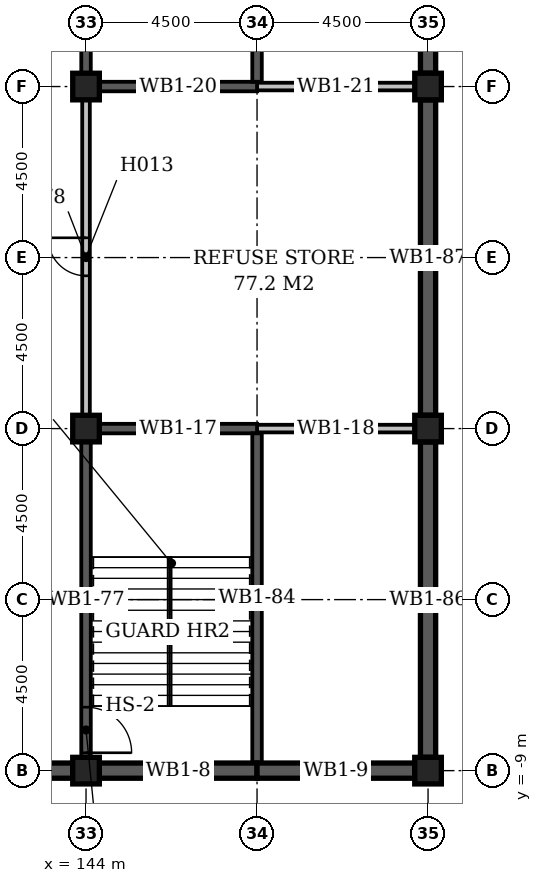
"""IFC4 building model, lengths in metres.
Left out: names, types, materials, properties, quantities, classifications, styles, units other than length and angle.
Written with IfcOpenShell. Run it as: python <this file> out.ifc"""

import sys

from ifc_helpers import new_model, si_unit, direction, frame, frame_2d, origin, origin_2d, place, context, subcontext, project, spatial, rectangle, extrude, element, fill, save


model = new_model("IFC4")
c1 = context("Model", 3, precision=1e-05, world=origin(), true_north=direction((0.0, 1.0)))
c2 = subcontext(c1, "Body", "Model", "MODEL_VIEW")
j1 = project(units=[si_unit("LENGTHUNIT", "METRE"), si_unit("PLANEANGLEUNIT", "RADIAN")], contexts=[c1])
p1 = place(None, origin())
s1 = spatial("IfcSite", under=j1, at=p1, CompositionType="ELEMENT")
p2 = place(p1, origin())
s2 = spatial("IfcBuilding", under=s1, at=p2, CompositionType="ELEMENT")
p3 = place(p2, frame((0.0, 0.0, -4.5)))
s3 = spatial("IfcBuildingStorey", under=s2, at=p3, CompositionType="ELEMENT", Elevation=-4.5)
for number, where, z_axis, x_axis in (
    (1, (144.0, -9.0, 0.0), (0.0, 0.0, 1.0), (1.0, 0.0, 0.0)),
    (2, (144.0, 0.0, 0.0), (0.0, 0.0, 1.0), (1.0, 0.0, 0.0)),
    (3, (144.0, 9.0, 0.0), (0.0, 0.0, 1.0), (1.0, 0.0, 0.0)),
    (4, (153.0, -9.0, 0.0), (0.0, 0.0, 1.0), (1.0, 0.0, 0.0)),
    (5, (153.0, 0.0, 0.0), (0.0, 0.0, 1.0), (1.0, 0.0, 0.0)),
    (6, (153.0, 9.0, 0.0), (0.0, 0.0, 1.0), (1.0, 0.0, 0.0)),
):
    element("IfcColumn", number, at=place(p3, frame(where, z_axis=z_axis, x_axis=x_axis)), inside=s3, PredefinedType="COLUMN", context=c2, shape_type="SweptSolid", body=[
        extrude(rectangle(XDim=0.7, YDim=0.7, at=origin_2d()), origin(), (0.0, 0.0, 1.0), 4.2),
    ])
p4 = place(p3, frame((135.35, -9.0, 0.0), z_axis=(0.0, 0.0, 1.0), x_axis=(1.0, 0.0, 0.0)))
e7 = element("IfcWall", 7, at=p4, inside=s3, PredefinedType="STANDARD", context=c2, shape_type="SweptSolid", body=[
    extrude(rectangle(XDim=8.3, YDim=0.4, at=frame_2d((4.15, 0.0))), origin(), (0.0, 0.0, 1.0), 4.2),
])
p5 = place(p3, frame((144.35, -9.0, 0.0), z_axis=(0.0, 0.0, 1.0), x_axis=(1.0, 0.0, 0.0)))
e8 = element("IfcWall", 8, at=p5, inside=s3, PredefinedType="STANDARD", context=c2, shape_type="SweptSolid", body=[
    extrude(rectangle(XDim=4.15, YDim=0.4, at=frame_2d((2.075, 0.0))), origin(), (0.0, 0.0, 1.0), 4.5),
])
p6 = place(p3, frame((148.5, -9.0, 0.0), z_axis=(0.0, 0.0, 1.0), x_axis=(1.0, 0.0, 0.0)))
e9 = element("IfcWall", 9, at=p6, inside=s3, PredefinedType="STANDARD", context=c2, shape_type="SweptSolid", body=[
    extrude(rectangle(XDim=4.15, YDim=0.4, at=frame_2d((2.075, 0.0))), origin(), (0.0, 0.0, 1.0), 4.2),
])
p7 = place(p3, frame((144.35, 0.0, 0.0), z_axis=(0.0, 0.0, 1.0), x_axis=(1.0, 0.0, 0.0)))
e10 = element("IfcWall", 10, at=p7, inside=s3, PredefinedType="STANDARD", context=c2, shape_type="SweptSolid", body=[
    extrude(rectangle(XDim=4.15, YDim=0.25, at=frame_2d((2.075, 0.0))), origin(), (0.0, 0.0, 1.0), 4.5),
])
p8 = place(p3, frame((148.5, 0.0, 0.0), z_axis=(0.0, 0.0, 1.0), x_axis=(1.0, 0.0, 0.0)))
e11 = element("IfcWall", 11, at=p8, inside=s3, PredefinedType="STANDARD", context=c2, shape_type="SweptSolid", body=[
    extrude(rectangle(XDim=4.15, YDim=0.2, at=frame_2d((2.075, 0.0))), origin(), (0.0, 0.0, 1.0), 4.2),
])
p9 = place(p3, frame((144.35, 9.0, 0.0), z_axis=(0.0, 0.0, 1.0), x_axis=(1.0, 0.0, 0.0)))
e12 = element("IfcWall", 12, at=p9, inside=s3, PredefinedType="STANDARD", context=c2, shape_type="SweptSolid", body=[
    extrude(rectangle(XDim=4.15, YDim=0.25, at=frame_2d((2.075, 0.0))), origin(), (0.0, 0.0, 1.0), 4.5),
])
p10 = place(p3, frame((148.5, 9.0, 0.0), z_axis=(0.0, 0.0, 1.0), x_axis=(1.0, 0.0, 0.0)))
e13 = element("IfcWall", 13, at=p10, inside=s3, PredefinedType="STANDARD", context=c2, shape_type="SweptSolid", body=[
    extrude(rectangle(XDim=4.15, YDim=0.2, at=frame_2d((2.075, 0.0))), origin(), (0.0, 0.0, 1.0), 4.2),
])
p11 = place(p3, frame((144.0, -8.65, 0.0), z_axis=(0.0, 0.0, 1.0), x_axis=(0.0, 1.0, 0.0)))
e14 = element("IfcWall", 14, at=p11, inside=s3, PredefinedType="STANDARD", context=c2, shape_type="SweptSolid", body=[
    extrude(rectangle(XDim=8.3, YDim=0.25, at=frame_2d((4.15, 0.0))), origin(), (0.0, 0.0, 1.0), 4.5),
])
p12 = place(p11, frame((0.12, 0.0, 0.0)))
e15 = element("IfcOpeningElement", 15, at=p12, cuts=e14, PredefinedType="OPENING", context=c2, shape_type="SweptSolid", body=[
    extrude(rectangle(XDim=1.2, YDim=2.1, at=frame_2d((0.6, 1.05))), frame((0.0, 0.137, 0.0), z_axis=(0.0, -1.0, 0.0), x_axis=(1.0, 0.0, 0.0)), (0.0, 0.0, 1.0), 0.274),
])
p13 = place(p3, frame((144.0, 0.35, 0.0), z_axis=(0.0, 0.0, 1.0), x_axis=(0.0, 1.0, 0.0)))
e16 = element("IfcWall", 16, at=p13, inside=s3, PredefinedType="STANDARD", context=c2, shape_type="SweptSolid", body=[
    extrude(rectangle(XDim=8.3, YDim=0.2, at=frame_2d((4.15, 0.0))), origin(), (0.0, 0.0, 1.0), 4.2),
])
p14 = place(p13, frame((3.67, 0.0, 0.0)))
e17 = element("IfcOpeningElement", 17, at=p14, cuts=e16, PredefinedType="OPENING", context=c2, shape_type="SweptSolid", body=[
    extrude(rectangle(XDim=1.0, YDim=2.1, at=frame_2d((0.5, 1.05))), frame((0.0, 0.112, 0.0), z_axis=(0.0, -1.0, 0.0), x_axis=(1.0, 0.0, 0.0)), (0.0, 0.0, 1.0), 0.224),
])
p15 = place(p3, frame((144.0, 9.35, 0.0), z_axis=(0.0, 0.0, 1.0), x_axis=(0.0, 1.0, 0.0)))
e18 = element("IfcWall", 18, at=p15, inside=s3, PredefinedType="STANDARD", context=c2, shape_type="SweptSolid", body=[
    extrude(rectangle(XDim=4.025, YDim=0.25, at=frame_2d((2.012, 0.0))), origin(), (0.0, 0.0, 1.0), 4.5),
])
p16 = place(p3, frame((148.5, -8.8, 0.0), z_axis=(0.0, 0.0, 1.0), x_axis=(0.0, 1.0, 0.0)))
e19 = element("IfcWall", 19, at=p16, inside=s3, PredefinedType="STANDARD", context=c2, shape_type="SweptSolid", body=[
    extrude(rectangle(XDim=8.675, YDim=0.25, at=frame_2d((4.337, 0.0))), origin(), (0.0, 0.0, 1.0), 4.5),
])
p17 = place(p3, frame((148.5, 9.125, 0.0), z_axis=(0.0, 0.0, 1.0), x_axis=(0.0, 1.0, 0.0)))
e20 = element("IfcWall", 20, at=p17, inside=s3, PredefinedType="STANDARD", context=c2, shape_type="SweptSolid", body=[
    extrude(rectangle(XDim=4.25, YDim=0.25, at=frame_2d((2.125, 0.0))), origin(), (0.0, 0.0, 1.0), 4.5),
])
for number, where, z_axis, x_axis in (
    (21, (153.0, -8.65, 0.0), (0.0, 0.0, 1.0), (0.0, 1.0, 0.0)),
    (22, (153.0, 0.35, 0.0), (0.0, 0.0, 1.0), (0.0, 1.0, 0.0)),
    (23, (153.0, 9.35, 0.0), (0.0, 0.0, 1.0), (0.0, 1.0, 0.0)),
):
    element("IfcWall", number, at=place(p3, frame(where, z_axis=z_axis, x_axis=x_axis)), inside=s3, PredefinedType="STANDARD", context=c2, shape_type="SweptSolid", body=[
        extrude(rectangle(XDim=8.3, YDim=0.4, at=frame_2d((4.15, 0.0))), origin(), (0.0, 0.0, 1.0), 4.2),
    ])
p18 = place(p12, frame((1.2, 0.0, 0.0), z_axis=(0.0, 0.0, 1.0), x_axis=(-1.0, 0.0, 0.0)))
e24 = element("IfcDoor", 24, at=p18, inside=s3, OperationType="SINGLE_SWING_RIGHT", PredefinedType="DOOR", context=c2, shape_type="SweptSolid", body=[
    extrude(rectangle(XDim=1.2, YDim=2.1, at=frame_2d((0.6, 1.05))), frame((0.0, 0.025, 0.0), z_axis=(0.0, -1.0, 0.0), x_axis=(1.0, 0.0, 0.0)), (0.0, 0.0, 1.0), 0.05),
])
fill(e15, e24)
p19 = place(p14, frame((1.0, 0.0, 0.0), z_axis=(0.0, 0.0, 1.0), x_axis=(-1.0, 0.0, 0.0)))
e25 = element("IfcDoor", 25, at=p19, inside=s3, OperationType="SINGLE_SWING_LEFT", PredefinedType="DOOR", context=c2, shape_type="SweptSolid", body=[
    extrude(rectangle(XDim=1.0, YDim=2.1, at=frame_2d((0.5, 1.05))), frame((0.0, 0.025, 0.0), z_axis=(0.0, -1.0, 0.0), x_axis=(1.0, 0.0, 0.0)), (0.0, 0.0, 1.0), 0.05),
])
fill(e17, e25)
save(model, sys.argv[1])
